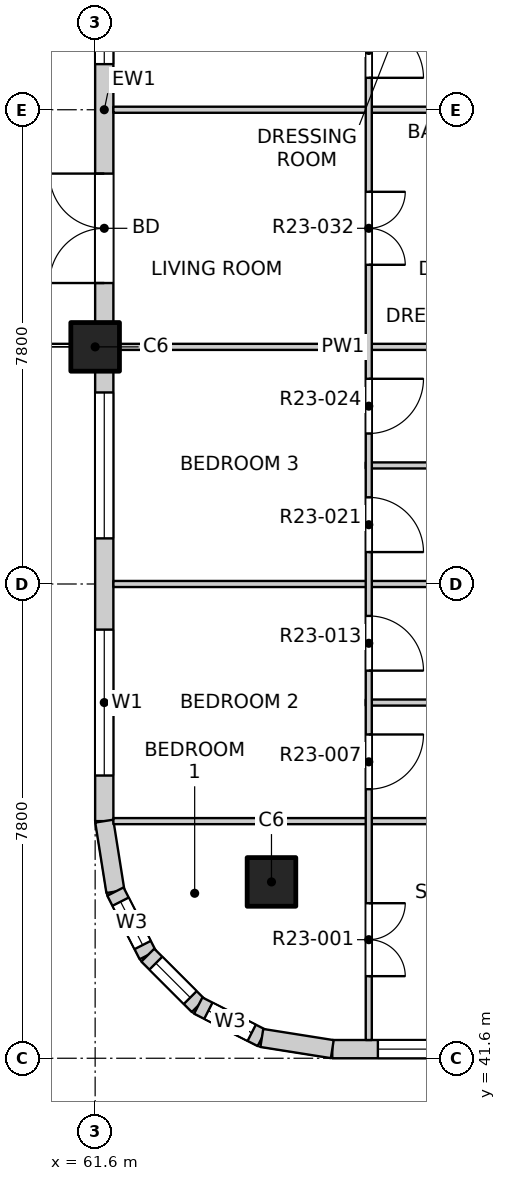
"""IFC4 building model, lengths in metres.
Left out: names, types, materials, properties, quantities, classifications, styles, units other than length and angle.
Written with IfcOpenShell. Run it as: python <this file> out.ifc"""

import sys

from ifc_helpers import new_model, si_unit, direction, frame, frame_2d, origin, origin_2d, place, context, subcontext, project, spatial, rectangle, extrude, element, fill, save


model = new_model("IFC4")
c1 = context("Model", 3, precision=1e-05, world=origin(), true_north=direction((0.0, 1.0)))
c2 = subcontext(c1, "Body", "Model", "MODEL_VIEW")
j1 = project(units=[si_unit("LENGTHUNIT", "METRE"), si_unit("PLANEANGLEUNIT", "RADIAN")], contexts=[c1])
p1 = place(None, origin())
s1 = spatial("IfcSite", under=j1, at=p1, CompositionType="ELEMENT")
p2 = place(p1, origin())
s2 = spatial("IfcBuilding", under=s1, at=p2, CompositionType="ELEMENT")
p3 = place(p2, frame((0.0, 0.0, 234.7)))
s3 = spatial("IfcBuildingStorey", under=s2, at=p3, CompositionType="ELEMENT", Elevation=234.7)
for number, where, z_axis, x_axis in (
    (1, (64.5, 44.5, -0.25), (0.0, 0.0, 1.0), (1.0, 0.0, 0.0)),
    (2, (61.6, 53.3, -0.25), (0.0, 0.0, 1.0), (1.0, 0.0, 0.0)),
):
    element("IfcColumn", number, at=place(p3, frame(where, z_axis=z_axis, x_axis=x_axis)), inside=s3, PredefinedType="COLUMN", context=c2, shape_type="SweptSolid", body=[
        extrude(rectangle(XDim=0.8, YDim=0.8, at=origin_2d()), origin(), (0.0, 0.0, 1.0), 3.4),
    ])
p4 = place(p3, frame((65.5, 41.75, 0.0), z_axis=(0.0, 0.0, 1.0), x_axis=(1.0, 0.0, 0.0)))
e3 = element("IfcWall", 3, at=p4, inside=s3, PredefinedType="SOLIDWALL", context=c2, shape_type="SweptSolid", body=[
    extrude(rectangle(XDim=7.4, YDim=0.3, at=frame_2d((3.7, 0.0))), origin(), (0.0, 0.0, 1.0), 2.7),
])
p5 = place(p4, frame((0.75, 0.0, 0.9)))
e4 = element("IfcOpeningElement", 4, at=p5, cuts=e3, PredefinedType="OPENING", context=c2, shape_type="SweptSolid", body=[
    extrude(rectangle(XDim=2.4, YDim=1.8, at=frame_2d((1.2, 0.9))), frame((0.0, 0.16, 0.0), z_axis=(0.0, -1.0, 0.0), x_axis=(1.0, 0.0, 0.0)), (0.0, 0.0, 1.0), 0.32),
])
p6 = place(p4, frame((4.65, 0.0, 0.9)))
e5 = element("IfcOpeningElement", 5, at=p6, cuts=e3, PredefinedType="OPENING", context=c2, shape_type="SweptSolid", body=[
    extrude(rectangle(XDim=2.4, YDim=1.8, at=frame_2d((1.2, 0.9))), frame((0.0, 0.16, 0.0), z_axis=(0.0, -1.0, 0.0), x_axis=(1.0, 0.0, 0.0)), (0.0, 0.0, 1.0), 0.32),
])
p7 = place(p3, frame((61.75, 45.5, 0.0), z_axis=(0.0, 0.0, 1.0), x_axis=(0.0, 1.0, 0.0)))
e6 = element("IfcWall", 6, at=p7, inside=s3, PredefinedType="SOLIDWALL", context=c2, shape_type="SweptSolid", body=[
    extrude(rectangle(XDim=7.4, YDim=0.3, at=frame_2d((3.7, 0.0))), origin(), (0.0, 0.0, 1.0), 2.7),
])
p8 = place(p7, frame((0.75, 0.0, 0.9)))
e7 = element("IfcOpeningElement", 7, at=p8, cuts=e6, PredefinedType="OPENING", context=c2, shape_type="SweptSolid", body=[
    extrude(rectangle(XDim=2.4, YDim=1.8, at=frame_2d((1.2, 0.9))), frame((0.0, 0.16, 0.0), z_axis=(0.0, -1.0, 0.0), x_axis=(1.0, 0.0, 0.0)), (0.0, 0.0, 1.0), 0.32),
])
p9 = place(p7, frame((4.65, 0.0, 0.9)))
e8 = element("IfcOpeningElement", 8, at=p9, cuts=e6, PredefinedType="OPENING", context=c2, shape_type="SweptSolid", body=[
    extrude(rectangle(XDim=2.4, YDim=1.8, at=frame_2d((1.2, 0.9))), frame((0.0, 0.16, 0.0), z_axis=(0.0, -1.0, 0.0), x_axis=(1.0, 0.0, 0.0)), (0.0, 0.0, 1.0), 0.32),
])
p10 = place(p3, frame((61.75, 53.7, 0.0), z_axis=(0.0, 0.0, 1.0), x_axis=(0.0, 1.0, 0.0)))
e9 = element("IfcWall", 9, at=p10, inside=s3, PredefinedType="SOLIDWALL", context=c2, shape_type="SweptSolid", body=[
    extrude(rectangle(XDim=7.0, YDim=0.3, at=frame_2d((3.5, 0.0))), origin(), (0.0, 0.0, 1.0), 2.7),
])
p11 = place(p10, frame((0.65, 0.0, 0.0)))
e10 = element("IfcOpeningElement", 10, at=p11, cuts=e9, PredefinedType="OPENING", context=c2, shape_type="SweptSolid", body=[
    extrude(rectangle(XDim=1.8, YDim=2.4, at=frame_2d((0.9, 1.2))), frame((0.0, 0.16, 0.0), z_axis=(0.0, -1.0, 0.0), x_axis=(1.0, 0.0, 0.0)), (0.0, 0.0, 1.0), 0.32),
])
p12 = place(p10, frame((4.25, 0.0, 0.9)))
e11 = element("IfcOpeningElement", 11, at=p12, cuts=e9, PredefinedType="OPENING", context=c2, shape_type="SweptSolid", body=[
    extrude(rectangle(XDim=2.4, YDim=1.8, at=frame_2d((1.2, 0.9))), frame((0.0, 0.16, 0.0), z_axis=(0.0, -1.0, 0.0), x_axis=(1.0, 0.0, 0.0)), (0.0, 0.0, 1.0), 0.32),
])
p13 = place(p3, frame((61.75, 45.5, 0.0), z_axis=(0.0, 0.0, 1.0), x_axis=(0.156496880861, -0.987678452879, 0.0)))
e12 = element("IfcWall", 12, at=p13, inside=s3, PredefinedType="SOLIDWALL", context=c2, shape_type="SweptSolid", body=[
    extrude(rectangle(XDim=1.173, YDim=0.3, at=frame_2d((0.586, 0.0))), origin(), (0.0, 0.0, 1.0), 2.7),
])
p14 = place(p3, frame((61.934, 44.341, 0.0), z_axis=(0.0, 0.0, 1.0), x_axis=(0.454025524128, -0.890988677504, 0.0)))
e13 = element("IfcWall", 13, at=p14, inside=s3, PredefinedType="SOLIDWALL", context=c2, shape_type="SweptSolid", body=[
    extrude(rectangle(XDim=1.173, YDim=0.3, at=frame_2d((0.587, 0.0))), origin(), (0.0, 0.0, 1.0), 2.7),
])
p15 = place(p14, frame((0.187, 0.0, 0.9)))
e14 = element("IfcOpeningElement", 14, at=p15, cuts=e13, PredefinedType="OPENING", context=c2, shape_type="SweptSolid", body=[
    extrude(rectangle(XDim=0.8, YDim=1.2, at=frame_2d((0.4, 0.6))), frame((0.0, 0.16, 0.0), z_axis=(0.0, -1.0, 0.0), x_axis=(1.0, 0.0, 0.0)), (0.0, 0.0, 1.0), 0.32),
])
p16 = place(p3, frame((62.466, 43.296, 0.0), z_axis=(0.0, 0.0, 1.0), x_axis=(0.707106781187, -0.707106781187, 0.0)))
e15 = element("IfcWall", 15, at=p16, inside=s3, PredefinedType="SOLIDWALL", context=c2, shape_type="SweptSolid", body=[
    extrude(rectangle(XDim=1.173, YDim=0.3, at=frame_2d((0.586, 0.0))), origin(), (0.0, 0.0, 1.0), 2.7),
])
p17 = place(p16, frame((0.187, 0.0, 0.9)))
e16 = element("IfcOpeningElement", 16, at=p17, cuts=e15, PredefinedType="OPENING", context=c2, shape_type="SweptSolid", body=[
    extrude(rectangle(XDim=0.8, YDim=1.2, at=frame_2d((0.4, 0.6))), frame((0.0, 0.16, 0.0), z_axis=(0.0, -1.0, 0.0), x_axis=(1.0, 0.0, 0.0)), (0.0, 0.0, 1.0), 0.32),
])
p18 = place(p3, frame((63.296, 42.466, 0.0), z_axis=(0.0, 0.0, 1.0), x_axis=(0.890988677504, -0.454025524128, 0.0)))
e17 = element("IfcWall", 17, at=p18, inside=s3, PredefinedType="SOLIDWALL", context=c2, shape_type="SweptSolid", body=[
    extrude(rectangle(XDim=1.173, YDim=0.3, at=frame_2d((0.587, 0.0))), origin(), (0.0, 0.0, 1.0), 2.7),
])
p19 = place(p18, frame((0.187, 0.0, 0.9)))
e18 = element("IfcOpeningElement", 18, at=p19, cuts=e17, PredefinedType="OPENING", context=c2, shape_type="SweptSolid", body=[
    extrude(rectangle(XDim=0.8, YDim=1.2, at=frame_2d((0.4, 0.6))), frame((0.0, 0.16, 0.0), z_axis=(0.0, -1.0, 0.0), x_axis=(1.0, 0.0, 0.0)), (0.0, 0.0, 1.0), 0.32),
])
p20 = place(p3, frame((64.341, 41.934, 0.0), z_axis=(0.0, 0.0, 1.0), x_axis=(0.987678452879, -0.156496880861, 0.0)))
e19 = element("IfcWall", 19, at=p20, inside=s3, PredefinedType="SOLIDWALL", context=c2, shape_type="SweptSolid", body=[
    extrude(rectangle(XDim=1.173, YDim=0.3, at=frame_2d((0.586, 0.0))), origin(), (0.0, 0.0, 1.0), 2.7),
])
p21 = place(p3, frame((61.9, 45.5, 0.0), z_axis=(0.0, 0.0, 1.0), x_axis=(1.0, 0.0, 0.0)))
e20 = element("IfcWall", 20, at=p21, inside=s3, PredefinedType="PARTITIONING", context=c2, shape_type="SweptSolid", body=[
    extrude(rectangle(XDim=11.475, YDim=0.1, at=frame_2d((5.737, 0.0))), origin(), (0.0, 0.0, 1.0), 3.15),
])
p22 = place(p21, frame((7.965, 0.0, 0.0)))
e21 = element("IfcOpeningElement", 21, at=p22, cuts=e20, PredefinedType="OPENING", context=c2, shape_type="SweptSolid", body=[
    extrude(rectangle(XDim=0.9, YDim=2.1, at=frame_2d((0.45, 1.05))), frame((0.0, 0.06, 0.0), z_axis=(0.0, -1.0, 0.0), x_axis=(1.0, 0.0, 0.0)), (0.0, 0.0, 1.0), 0.12),
])
p23 = place(p3, frame((66.05, 47.45, 0.0), z_axis=(0.0, 0.0, 1.0), x_axis=(1.0, 0.0, 0.0)))
e22 = element("IfcWall", 22, at=p23, inside=s3, PredefinedType="PARTITIONING", context=c2, shape_type="SweptSolid", body=[
    extrude(rectangle(XDim=3.4, YDim=0.1, at=frame_2d((1.7, 0.0))), origin(), (0.0, 0.0, 1.0), 3.15),
])
p24 = place(p3, frame((61.9, 49.4, 0.0), z_axis=(0.0, 0.0, 1.0), x_axis=(1.0, 0.0, 0.0)))
e23 = element("IfcWall", 23, at=p24, inside=s3, PredefinedType="PARTITIONING", context=c2, shape_type="SweptSolid", body=[
    extrude(rectangle(XDim=7.55, YDim=0.1, at=frame_2d((3.775, 0.0))), origin(), (0.0, 0.0, 1.0), 3.15),
])
p25 = place(p3, frame((66.05, 51.35, 0.0), z_axis=(0.0, 0.0, 1.0), x_axis=(1.0, 0.0, 0.0)))
e24 = element("IfcWall", 24, at=p25, inside=s3, PredefinedType="PARTITIONING", context=c2, shape_type="SweptSolid", body=[
    extrude(rectangle(XDim=3.4, YDim=0.1, at=frame_2d((1.7, 0.0))), origin(), (0.0, 0.0, 1.0), 3.15),
])
for number, where, z_axis, x_axis in (
    (25, (61.9, 53.3, 0.0), (0.0, 0.0, 1.0), (1.0, 0.0, 0.0)),
    (26, (61.9, 57.2, 0.0), (0.0, 0.0, 1.0), (1.0, 0.0, 0.0)),
):
    element("IfcWall", number, at=place(p3, frame(where, z_axis=z_axis, x_axis=x_axis)), inside=s3, PredefinedType="PARTITIONING", context=c2, shape_type="SweptSolid", body=[
        extrude(rectangle(XDim=7.55, YDim=0.1, at=frame_2d((3.775, 0.0))), origin(), (0.0, 0.0, 1.0), 3.15),
    ])
p26 = place(p3, frame((66.1, 41.9, 0.0), z_axis=(0.0, 0.0, 1.0), x_axis=(0.0, 1.0, 0.0)))
e27 = element("IfcWall", 27, at=p26, inside=s3, PredefinedType="PARTITIONING", context=c2, shape_type="SweptSolid", body=[
    extrude(rectangle(XDim=19.1, YDim=0.1, at=frame_2d((9.55, 0.0))), origin(), (0.0, 0.0, 1.0), 3.15),
])
p27 = place(p26, frame((1.05, 0.0, 0.0)))
e28 = element("IfcOpeningElement", 28, at=p27, cuts=e27, PredefinedType="OPENING", context=c2, shape_type="SweptSolid", body=[
    extrude(rectangle(XDim=1.2, YDim=2.1, at=frame_2d((0.6, 1.05))), frame((0.0, 0.06, 0.0), z_axis=(0.0, -1.0, 0.0), x_axis=(1.0, 0.0, 0.0)), (0.0, 0.0, 1.0), 0.12),
])
p28 = place(p26, frame((4.125, 0.0, 0.0)))
e29 = element("IfcOpeningElement", 29, at=p28, cuts=e27, PredefinedType="OPENING", context=c2, shape_type="SweptSolid", body=[
    extrude(rectangle(XDim=0.9, YDim=2.1, at=frame_2d((0.45, 1.05))), frame((0.0, 0.06, 0.0), z_axis=(0.0, -1.0, 0.0), x_axis=(1.0, 0.0, 0.0)), (0.0, 0.0, 1.0), 0.12),
])
p29 = place(p26, frame((6.075, 0.0, 0.0)))
e30 = element("IfcOpeningElement", 30, at=p29, cuts=e27, PredefinedType="OPENING", context=c2, shape_type="SweptSolid", body=[
    extrude(rectangle(XDim=0.9, YDim=2.1, at=frame_2d((0.45, 1.05))), frame((0.0, 0.06, 0.0), z_axis=(0.0, -1.0, 0.0), x_axis=(1.0, 0.0, 0.0)), (0.0, 0.0, 1.0), 0.12),
])
p30 = place(p26, frame((8.025, 0.0, 0.0)))
e31 = element("IfcOpeningElement", 31, at=p30, cuts=e27, PredefinedType="OPENING", context=c2, shape_type="SweptSolid", body=[
    extrude(rectangle(XDim=0.9, YDim=2.1, at=frame_2d((0.45, 1.05))), frame((0.0, 0.06, 0.0), z_axis=(0.0, -1.0, 0.0), x_axis=(1.0, 0.0, 0.0)), (0.0, 0.0, 1.0), 0.12),
])
p31 = place(p26, frame((9.975, 0.0, 0.0)))
e32 = element("IfcOpeningElement", 32, at=p31, cuts=e27, PredefinedType="OPENING", context=c2, shape_type="SweptSolid", body=[
    extrude(rectangle(XDim=0.9, YDim=2.1, at=frame_2d((0.45, 1.05))), frame((0.0, 0.06, 0.0), z_axis=(0.0, -1.0, 0.0), x_axis=(1.0, 0.0, 0.0)), (0.0, 0.0, 1.0), 0.12),
])
p32 = place(p26, frame((12.75, 0.0, 0.0)))
e33 = element("IfcOpeningElement", 33, at=p32, cuts=e27, PredefinedType="OPENING", context=c2, shape_type="SweptSolid", body=[
    extrude(rectangle(XDim=1.2, YDim=2.1, at=frame_2d((0.6, 1.05))), frame((0.0, 0.06, 0.0), z_axis=(0.0, -1.0, 0.0), x_axis=(1.0, 0.0, 0.0)), (0.0, 0.0, 1.0), 0.12),
])
p33 = place(p26, frame((15.825, 0.0, 0.0)))
e34 = element("IfcOpeningElement", 34, at=p33, cuts=e27, PredefinedType="OPENING", context=c2, shape_type="SweptSolid", body=[
    extrude(rectangle(XDim=0.9, YDim=2.1, at=frame_2d((0.45, 1.05))), frame((0.0, 0.06, 0.0), z_axis=(0.0, -1.0, 0.0), x_axis=(1.0, 0.0, 0.0)), (0.0, 0.0, 1.0), 0.12),
])
p34 = place(p26, frame((17.775, 0.0, 0.0)))
e35 = element("IfcOpeningElement", 35, at=p34, cuts=e27, PredefinedType="OPENING", context=c2, shape_type="SweptSolid", body=[
    extrude(rectangle(XDim=0.9, YDim=2.1, at=frame_2d((0.45, 1.05))), frame((0.0, 0.06, 0.0), z_axis=(0.0, -1.0, 0.0), x_axis=(1.0, 0.0, 0.0)), (0.0, 0.0, 1.0), 0.12),
])
p35 = place(p5, origin())
e36 = element("IfcWindow", 36, at=p35, inside=s3, PartitioningType="DOUBLE_PANEL_VERTICAL", PredefinedType="WINDOW", context=c2, shape_type="SweptSolid", body=[
    extrude(rectangle(XDim=2.4, YDim=1.8, at=frame_2d((1.2, 0.9))), frame((0.0, 0.03, 0.0), z_axis=(0.0, -1.0, 0.0), x_axis=(1.0, 0.0, 0.0)), (0.0, 0.0, 1.0), 0.06),
])
fill(e4, e36)
p36 = place(p8, origin())
e37 = element("IfcWindow", 37, at=p36, inside=s3, PartitioningType="DOUBLE_PANEL_VERTICAL", PredefinedType="WINDOW", context=c2, shape_type="SweptSolid", body=[
    extrude(rectangle(XDim=2.4, YDim=1.8, at=frame_2d((1.2, 0.9))), frame((0.0, 0.03, 0.0), z_axis=(0.0, -1.0, 0.0), x_axis=(1.0, 0.0, 0.0)), (0.0, 0.0, 1.0), 0.06),
])
fill(e7, e37)
p37 = place(p9, origin())
e38 = element("IfcWindow", 38, at=p37, inside=s3, PartitioningType="DOUBLE_PANEL_VERTICAL", PredefinedType="WINDOW", context=c2, shape_type="SweptSolid", body=[
    extrude(rectangle(XDim=2.4, YDim=1.8, at=frame_2d((1.2, 0.9))), frame((0.0, 0.03, 0.0), z_axis=(0.0, -1.0, 0.0), x_axis=(1.0, 0.0, 0.0)), (0.0, 0.0, 1.0), 0.06),
])
fill(e8, e38)
p38 = place(p11, origin())
e39 = element("IfcDoor", 39, at=p38, inside=s3, OperationType="DOUBLE_DOOR_SINGLE_SWING", PredefinedType="DOOR", context=c2, shape_type="SweptSolid", body=[
    extrude(rectangle(XDim=1.8, YDim=2.4, at=frame_2d((0.9, 1.2))), frame((0.0, 0.025, 0.0), z_axis=(0.0, -1.0, 0.0), x_axis=(1.0, 0.0, 0.0)), (0.0, 0.0, 1.0), 0.05),
])
fill(e10, e39)
p39 = place(p12, origin())
e40 = element("IfcWindow", 40, at=p39, inside=s3, PartitioningType="DOUBLE_PANEL_VERTICAL", PredefinedType="WINDOW", context=c2, shape_type="SweptSolid", body=[
    extrude(rectangle(XDim=2.4, YDim=1.8, at=frame_2d((1.2, 0.9))), frame((0.0, 0.03, 0.0), z_axis=(0.0, -1.0, 0.0), x_axis=(1.0, 0.0, 0.0)), (0.0, 0.0, 1.0), 0.06),
])
fill(e11, e40)
p40 = place(p15, origin())
e41 = element("IfcWindow", 41, at=p40, inside=s3, PartitioningType="SINGLE_PANEL", PredefinedType="WINDOW", context=c2, shape_type="SweptSolid", body=[
    extrude(rectangle(XDim=0.8, YDim=1.2, at=frame_2d((0.4, 0.6))), frame((0.0, 0.03, 0.0), z_axis=(0.0, -1.0, 0.0), x_axis=(1.0, 0.0, 0.0)), (0.0, 0.0, 1.0), 0.06),
])
fill(e14, e41)
p41 = place(p17, origin())
e42 = element("IfcWindow", 42, at=p41, inside=s3, PartitioningType="SINGLE_PANEL", PredefinedType="WINDOW", context=c2, shape_type="SweptSolid", body=[
    extrude(rectangle(XDim=0.8, YDim=1.2, at=frame_2d((0.4, 0.6))), frame((0.0, 0.03, 0.0), z_axis=(0.0, -1.0, 0.0), x_axis=(1.0, 0.0, 0.0)), (0.0, 0.0, 1.0), 0.06),
])
fill(e16, e42)
p42 = place(p19, origin())
e43 = element("IfcWindow", 43, at=p42, inside=s3, PartitioningType="SINGLE_PANEL", PredefinedType="WINDOW", context=c2, shape_type="SweptSolid", body=[
    extrude(rectangle(XDim=0.8, YDim=1.2, at=frame_2d((0.4, 0.6))), frame((0.0, 0.03, 0.0), z_axis=(0.0, -1.0, 0.0), x_axis=(1.0, 0.0, 0.0)), (0.0, 0.0, 1.0), 0.06),
])
fill(e18, e43)
p43 = place(p27, origin())
e44 = element("IfcDoor", 44, at=p43, inside=s3, OperationType="DOUBLE_DOOR_SINGLE_SWING", PredefinedType="DOOR", context=c2, shape_type="SweptSolid", body=[
    extrude(rectangle(XDim=1.2, YDim=2.1, at=frame_2d((0.6, 1.05))), frame((0.0, 0.025, 0.0), z_axis=(0.0, -1.0, 0.0), x_axis=(1.0, 0.0, 0.0)), (0.0, 0.0, 1.0), 0.05),
])
fill(e28, e44)
p44 = place(p28, origin())
e45 = element("IfcDoor", 45, at=p44, inside=s3, OperationType="SINGLE_SWING_LEFT", PredefinedType="DOOR", context=c2, shape_type="SweptSolid", body=[
    extrude(rectangle(XDim=0.9, YDim=2.1, at=frame_2d((0.45, 1.05))), frame((0.0, 0.025, 0.0), z_axis=(0.0, -1.0, 0.0), x_axis=(1.0, 0.0, 0.0)), (0.0, 0.0, 1.0), 0.05),
])
fill(e29, e45)
p45 = place(p29, origin())
e46 = element("IfcDoor", 46, at=p45, inside=s3, OperationType="SINGLE_SWING_RIGHT", PredefinedType="DOOR", context=c2, shape_type="SweptSolid", body=[
    extrude(rectangle(XDim=0.9, YDim=2.1, at=frame_2d((0.45, 1.05))), frame((0.0, 0.025, 0.0), z_axis=(0.0, -1.0, 0.0), x_axis=(1.0, 0.0, 0.0)), (0.0, 0.0, 1.0), 0.05),
])
fill(e30, e46)
p46 = place(p30, origin())
e47 = element("IfcDoor", 47, at=p46, inside=s3, OperationType="SINGLE_SWING_RIGHT", PredefinedType="DOOR", context=c2, shape_type="SweptSolid", body=[
    extrude(rectangle(XDim=0.9, YDim=2.1, at=frame_2d((0.45, 1.05))), frame((0.0, 0.025, 0.0), z_axis=(0.0, -1.0, 0.0), x_axis=(1.0, 0.0, 0.0)), (0.0, 0.0, 1.0), 0.05),
])
fill(e31, e47)
p47 = place(p31, origin())
e48 = element("IfcDoor", 48, at=p47, inside=s3, OperationType="SINGLE_SWING_LEFT", PredefinedType="DOOR", context=c2, shape_type="SweptSolid", body=[
    extrude(rectangle(XDim=0.9, YDim=2.1, at=frame_2d((0.45, 1.05))), frame((0.0, 0.025, 0.0), z_axis=(0.0, -1.0, 0.0), x_axis=(1.0, 0.0, 0.0)), (0.0, 0.0, 1.0), 0.05),
])
fill(e32, e48)
p48 = place(p32, origin())
e49 = element("IfcDoor", 49, at=p48, inside=s3, OperationType="DOUBLE_DOOR_SINGLE_SWING", PredefinedType="DOOR", context=c2, shape_type="SweptSolid", body=[
    extrude(rectangle(XDim=1.2, YDim=2.1, at=frame_2d((0.6, 1.05))), frame((0.0, 0.025, 0.0), z_axis=(0.0, -1.0, 0.0), x_axis=(1.0, 0.0, 0.0)), (0.0, 0.0, 1.0), 0.05),
])
fill(e33, e49)
p49 = place(p33, origin())
e50 = element("IfcDoor", 50, at=p49, inside=s3, OperationType="SINGLE_SWING_RIGHT", PredefinedType="DOOR", context=c2, shape_type="SweptSolid", body=[
    extrude(rectangle(XDim=0.9, YDim=2.1, at=frame_2d((0.45, 1.05))), frame((0.0, 0.025, 0.0), z_axis=(0.0, -1.0, 0.0), x_axis=(1.0, 0.0, 0.0)), (0.0, 0.0, 1.0), 0.05),
])
fill(e34, e50)
save(model, sys.argv[1])
